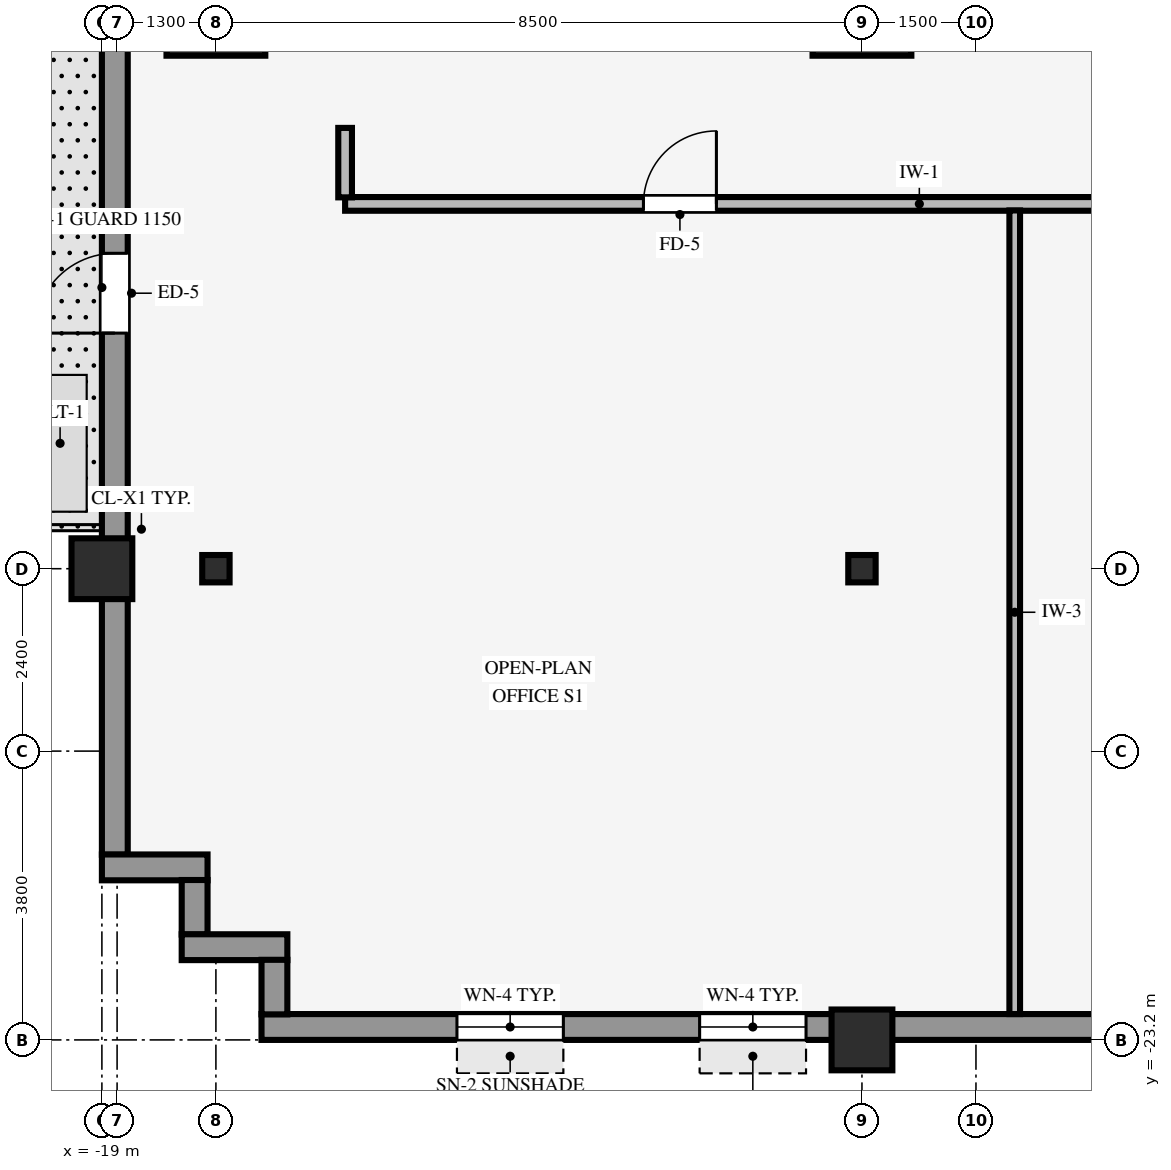
"""IFC4 building model, lengths in metres.
Left out: names, types, materials, properties, quantities, classifications, styles, units other than length and angle.
Written with IfcOpenShell. Run it as: python <this file> out.ifc"""

import sys

from ifc_helpers import new_model, si_unit, direction, frame, frame_2d, origin, origin_2d, place, context, subcontext, project, spatial, rectangle, hollow_rectangle, i_section, extrude, source, transform, mapped, element, fill, save


model = new_model("IFC4")
c1 = context("Model", 3, precision=1e-05, world=origin(), true_north=direction((0.0, 1.0)))
c2 = subcontext(c1, "Body", "Model", "MODEL_VIEW")
j1 = project(units=[si_unit("LENGTHUNIT", "METRE"), si_unit("PLANEANGLEUNIT", "RADIAN")], contexts=[c1])
p1 = place(None, origin())
s1 = spatial("IfcSite", under=j1, at=p1, CompositionType="ELEMENT")
p2 = place(p1, origin())
s2 = spatial("IfcBuilding", under=s1, at=p2, CompositionType="ELEMENT")
p3 = place(p2, frame((0.0, 0.0, 31.25)))
s3 = spatial("IfcBuildingStorey", under=s2, at=p3, CompositionType="ELEMENT", Elevation=31.25)
for number, where, z_axis, x_axis in (
    (1, (-17.5, -9.6, 0.0), (0.0, 0.0, 1.0), (1.0, 0.0, 0.0)),
    (2, (-9.0, -9.6, 0.0), (0.0, 0.0, 1.0), (1.0, 0.0, 0.0)),
):
    element("IfcColumn", number, at=place(p3, frame(where, z_axis=z_axis, x_axis=x_axis)), inside=s3, PredefinedType="COLUMN", context=c2, shape_type="SweptSolid", body=[
        extrude(rectangle(XDim=1.3, YDim=1.3, at=origin_2d()), origin(), (0.0, 0.0, 1.0), 3.37),
    ])
for number, where, z_axis, x_axis in (
    (3, (-19.0, -17.0, 0.0), (0.0, 0.0, 1.0), (1.0, 0.0, 0.0)),
    (4, (-9.0, -23.2, 0.0), (0.0, 0.0, 1.0), (1.0, 0.0, 0.0)),
):
    element("IfcColumn", number, at=place(p3, frame(where, z_axis=z_axis, x_axis=x_axis)), inside=s3, PredefinedType="COLUMN", context=c2, shape_type="SweptSolid", body=[
        extrude(hollow_rectangle(XDim=0.8, YDim=0.8, WallThickness=0.055, InnerFilletRadius=0.055, OuterFilletRadius=0.11, at=origin_2d()), origin(), (0.0, 0.0, 1.0), 3.37),
    ])
for number, where, z_axis, x_axis in (
    (5, (-17.5, -17.0, 0.0), (0.0, 0.0, 1.0), (1.0, 0.0, 0.0)),
    (6, (-9.0, -17.0, 0.0), (0.0, 0.0, 1.0), (1.0, 0.0, 0.0)),
):
    element("IfcColumn", number, at=place(p3, frame(where, z_axis=z_axis, x_axis=x_axis)), inside=s3, PredefinedType="COLUMN", context=c2, shape_type="SweptSolid", body=[
        extrude(i_section(OverallWidth=0.36, OverallDepth=0.36, WebThickness=0.021, FlangeThickness=0.021, FilletRadius=0.018, at=origin_2d()), origin(), (0.0, 0.0, 1.0), 3.37),
    ])
p4 = place(p3, frame((-16.9, -23.03, 0.0), z_axis=(0.0, 0.0, 1.0), x_axis=(1.0, 0.0, 0.0)))
e7 = element("IfcWall", 7, at=p4, inside=s3, PredefinedType="STANDARD", context=c2, shape_type="SweptSolid", body=[
    extrude(rectangle(XDim=33.8, YDim=0.34, at=frame_2d((16.9, 0.0))), origin(), (0.0, 0.0, 1.0), 2.705),
])
p5 = place(p4, frame((2.571, 0.0, 0.8)))
e8 = element("IfcOpeningElement", 8, at=p5, cuts=e7, PredefinedType="OPENING", context=c2, shape_type="SweptSolid", body=[
    extrude(rectangle(XDim=1.4, YDim=1.65, at=frame_2d((0.7, 0.825))), frame((0.0, 0.18, 0.0), z_axis=(0.0, -1.0, 0.0), x_axis=(1.0, 0.0, 0.0)), (0.0, 0.0, 1.0), 0.36),
])
p6 = place(p4, frame((5.764, 0.0, 0.8)))
e9 = element("IfcOpeningElement", 9, at=p6, cuts=e7, PredefinedType="OPENING", context=c2, shape_type="SweptSolid", body=[
    extrude(rectangle(XDim=1.4, YDim=1.65, at=frame_2d((0.7, 0.825))), frame((0.0, 0.18, 0.0), z_axis=(0.0, -1.0, 0.0), x_axis=(1.0, 0.0, 0.0)), (0.0, 0.0, 1.0), 0.36),
])
p7 = place(p4, frame((11.657, 0.0, 0.8)))
e10 = element("IfcOpeningElement", 10, at=p7, cuts=e7, PredefinedType="OPENING", context=c2, shape_type="SweptSolid", body=[
    extrude(rectangle(XDim=1.4, YDim=1.65, at=frame_2d((0.7, 0.825))), frame((0.0, 0.18, 0.0), z_axis=(0.0, -1.0, 0.0), x_axis=(1.0, 0.0, 0.0)), (0.0, 0.0, 1.0), 0.36),
])
p8 = place(p4, frame((20.743, 0.0, 0.8)))
e11 = element("IfcOpeningElement", 11, at=p8, cuts=e7, PredefinedType="OPENING", context=c2, shape_type="SweptSolid", body=[
    extrude(rectangle(XDim=1.4, YDim=1.65, at=frame_2d((0.7, 0.825))), frame((0.0, 0.18, 0.0), z_axis=(0.0, -1.0, 0.0), x_axis=(1.0, 0.0, 0.0)), (0.0, 0.0, 1.0), 0.36),
])
p9 = place(p4, frame((26.636, 0.0, 0.8)))
e12 = element("IfcOpeningElement", 12, at=p9, cuts=e7, PredefinedType="OPENING", context=c2, shape_type="SweptSolid", body=[
    extrude(rectangle(XDim=1.4, YDim=1.65, at=frame_2d((0.7, 0.825))), frame((0.0, 0.18, 0.0), z_axis=(0.0, -1.0, 0.0), x_axis=(1.0, 0.0, 0.0)), (0.0, 0.0, 1.0), 0.36),
])
p10 = place(p4, frame((29.829, 0.0, 0.8)))
e13 = element("IfcOpeningElement", 13, at=p10, cuts=e7, PredefinedType="OPENING", context=c2, shape_type="SweptSolid", body=[
    extrude(rectangle(XDim=1.4, YDim=1.65, at=frame_2d((0.7, 0.825))), frame((0.0, 0.18, 0.0), z_axis=(0.0, -1.0, 0.0), x_axis=(1.0, 0.0, 0.0)), (0.0, 0.0, 1.0), 0.36),
])
p11 = place(p3, frame((-18.83, -20.764, 0.0), z_axis=(0.0, 0.0, 1.0), x_axis=(0.0, 1.0, 0.0)))
e14 = element("IfcWall", 14, at=p11, inside=s3, PredefinedType="STANDARD", context=c2, shape_type="SweptSolid", body=[
    extrude(rectangle(XDim=41.528, YDim=0.34, at=frame_2d((20.764, 0.0))), origin(), (0.0, 0.0, 1.0), 2.705),
])
p12 = place(p11, frame((6.864, 0.0, 0.0)))
e15 = element("IfcOpeningElement", 15, at=p12, cuts=e14, PredefinedType="OPENING", context=c2, shape_type="SweptSolid", body=[
    extrude(rectangle(XDim=1.05, YDim=2.1, at=frame_2d((0.525, 1.05))), frame((0.0, 0.18, 0.0), z_axis=(0.0, -1.0, 0.0), x_axis=(1.0, 0.0, 0.0)), (0.0, 0.0, 1.0), 0.36),
])
p13 = place(p11, frame((32.467, 0.0, 0.8)))
e16 = element("IfcOpeningElement", 16, at=p13, cuts=e14, PredefinedType="OPENING", context=c2, shape_type="SweptSolid", body=[
    extrude(rectangle(XDim=2.2, YDim=1.65, at=frame_2d((1.1, 0.825))), frame((0.0, 0.18, 0.0), z_axis=(0.0, -1.0, 0.0), x_axis=(1.0, 0.0, 0.0)), (0.0, 0.0, 1.0), 0.36),
])
p14 = place(p3, frame((-19.0, -20.93, 0.0), z_axis=(0.0, 0.0, 1.0), x_axis=(1.0, 0.0, 0.0)))
e17 = element("IfcWall", 17, at=p14, inside=s3, PredefinedType="STANDARD", context=c2, shape_type="SweptSolid", body=[
    extrude(rectangle(XDim=1.39, YDim=0.34, at=frame_2d((0.695, 0.0))), origin(), (0.0, 0.0, 1.0), 3.36),
])
p15 = place(p3, frame((-17.78, -21.814, 0.0), z_axis=(0.0, 0.0, 1.0), x_axis=(0.0, 1.0, 0.0)))
e18 = element("IfcWall", 18, at=p15, inside=s3, PredefinedType="STANDARD", context=c2, shape_type="SweptSolid", body=[
    extrude(rectangle(XDim=0.718, YDim=0.34, at=frame_2d((0.359, 0.0))), origin(), (0.0, 0.0, 1.0), 3.36),
])
p16 = place(p3, frame((-17.95, -21.98, 0.0), z_axis=(0.0, 0.0, 1.0), x_axis=(1.0, 0.0, 0.0)))
e19 = element("IfcWall", 19, at=p16, inside=s3, PredefinedType="STANDARD", context=c2, shape_type="SweptSolid", body=[
    extrude(rectangle(XDim=1.39, YDim=0.34, at=frame_2d((0.695, 0.0))), origin(), (0.0, 0.0, 1.0), 3.36),
])
p17 = place(p3, frame((-16.73, -22.864, 0.0), z_axis=(0.0, 0.0, 1.0), x_axis=(0.0, 1.0, 0.0)))
e20 = element("IfcWall", 20, at=p17, inside=s3, PredefinedType="STANDARD", context=c2, shape_type="SweptSolid", body=[
    extrude(rectangle(XDim=0.718, YDim=0.34, at=frame_2d((0.359, 0.0))), origin(), (0.0, 0.0, 1.0), 3.36),
])
p18 = place(p3, frame((-15.8, -12.2, 0.0), z_axis=(0.0, 0.0, 1.0), x_axis=(1.0, 0.0, 0.0)))
e21 = element("IfcWall", 21, at=p18, inside=s3, PredefinedType="PARTITIONING", context=c2, shape_type="SweptSolid", body=[
    extrude(rectangle(XDim=24.6, YDim=0.18, at=frame_2d((12.3, 0.0))), origin(), (0.0, 0.0, 1.0), 3.36),
])
p19 = place(p18, frame((3.925, 0.0, 0.0)))
e22 = element("IfcOpeningElement", 22, at=p19, cuts=e21, PredefinedType="OPENING", context=c2, shape_type="SweptSolid", body=[
    extrude(rectangle(XDim=0.96, YDim=2.1, at=frame_2d((0.48, 1.05))), frame((0.0, 0.1, 0.0), z_axis=(0.0, -1.0, 0.0), x_axis=(1.0, 0.0, 0.0)), (0.0, 0.0, 1.0), 0.2),
])
p20 = place(p18, frame((10.225, 0.0, 0.0)))
e23 = element("IfcOpeningElement", 23, at=p20, cuts=e21, PredefinedType="OPENING", context=c2, shape_type="SweptSolid", body=[
    extrude(rectangle(XDim=0.96, YDim=2.1, at=frame_2d((0.48, 1.05))), frame((0.0, 0.1, 0.0), z_axis=(0.0, -1.0, 0.0), x_axis=(1.0, 0.0, 0.0)), (0.0, 0.0, 1.0), 0.2),
])
p21 = place(p18, frame((20.45, 0.0, 0.0)))
e24 = element("IfcOpeningElement", 24, at=p21, cuts=e21, PredefinedType="OPENING", context=c2, shape_type="SweptSolid", body=[
    extrude(rectangle(XDim=0.9, YDim=2.1, at=frame_2d((0.45, 1.05))), frame((0.0, 0.1, 0.0), z_axis=(0.0, -1.0, 0.0), x_axis=(1.0, 0.0, 0.0)), (0.0, 0.0, 1.0), 0.2),
])
p22 = place(p18, frame((17.85, 0.0, 0.0)))
e25 = element("IfcOpeningElement", 25, at=p22, cuts=e21, PredefinedType="OPENING", context=c2, shape_type="SweptSolid", body=[
    extrude(rectangle(XDim=0.9, YDim=2.1, at=frame_2d((0.45, 1.05))), frame((0.0, 0.1, 0.0), z_axis=(0.0, -1.0, 0.0), x_axis=(1.0, 0.0, 0.0)), (0.0, 0.0, 1.0), 0.2),
])
p23 = place(p18, frame((22.95, 0.0, 0.0)))
e26 = element("IfcOpeningElement", 26, at=p23, cuts=e21, PredefinedType="OPENING", context=c2, shape_type="SweptSolid", body=[
    extrude(rectangle(XDim=0.9, YDim=2.1, at=frame_2d((0.45, 1.05))), frame((0.0, 0.1, 0.0), z_axis=(0.0, -1.0, 0.0), x_axis=(1.0, 0.0, 0.0)), (0.0, 0.0, 1.0), 0.2),
])
p24 = place(p18, frame((15.52, 0.0, 0.0)))
e27 = element("IfcOpeningElement", 27, at=p24, cuts=e21, PredefinedType="OPENING", context=c2, shape_type="SweptSolid", body=[
    extrude(rectangle(XDim=0.96, YDim=2.1, at=frame_2d((0.48, 1.05))), frame((0.0, 0.1, 0.0), z_axis=(0.0, -1.0, 0.0), x_axis=(1.0, 0.0, 0.0)), (0.0, 0.0, 1.0), 0.2),
])
p25 = place(p3, frame((-15.8, -12.114, 0.0), z_axis=(0.0, 0.0, 1.0), x_axis=(0.0, 1.0, 0.0)))
e28 = element("IfcWall", 28, at=p25, inside=s3, PredefinedType="PARTITIONING", context=c2, shape_type="SweptSolid", body=[
    extrude(rectangle(XDim=0.914, YDim=0.18, at=frame_2d((0.457, 0.0))), origin(), (0.0, 0.0, 1.0), 3.36),
])
p26 = place(p3, frame((-6.99, -22.86, 0.0), z_axis=(0.0, 0.0, 1.0), x_axis=(0.0, 1.0, 0.0)))
e29 = element("IfcWall", 29, at=p26, inside=s3, PredefinedType="PARTITIONING", context=c2, shape_type="SweptSolid", body=[
    extrude(rectangle(XDim=10.574, YDim=0.14, at=frame_2d((5.287, 0.0))), origin(), (0.0, 0.0, 1.0), 3.36),
])
m1 = source(origin(), c2, "Body", "SweptSolid", [
    extrude(rectangle(XDim=1.4, YDim=1.65, at=frame_2d((0.7, 0.825))), frame((0.0, 0.03, 0.0), z_axis=(0.0, -1.0, 0.0), x_axis=(1.0, 0.0, 0.0)), (0.0, 0.0, 1.0), 0.06),
])
p27 = place(p5, origin())
e30 = element("IfcWindow", 30, at=p27, inside=s3, PartitioningType="SINGLE_PANEL", PredefinedType="WINDOW", context=c2, shape_type="MappedRepresentation", body=[
    mapped(m1, transform((0.0, 0.0, 0.0), scale=1.0)),
])
fill(e8, e30)
p28 = place(p6, origin())
e31 = element("IfcWindow", 31, at=p28, inside=s3, PartitioningType="SINGLE_PANEL", PredefinedType="WINDOW", context=c2, shape_type="MappedRepresentation", body=[
    mapped(m1, transform((0.0, 0.0, 0.0), scale=1.0)),
])
fill(e9, e31)
m2 = source(origin(), c2, "Body", "SweptSolid", [
    extrude(rectangle(XDim=1.05, YDim=2.1, at=frame_2d((0.525, 1.05))), frame((0.0, 0.025, 0.0), z_axis=(0.0, -1.0, 0.0), x_axis=(1.0, 0.0, 0.0)), (0.0, 0.0, 1.0), 0.05),
])
p29 = place(p12, origin())
e32 = element("IfcDoor", 32, at=p29, inside=s3, OperationType="SINGLE_SWING_LEFT", PredefinedType="DOOR", context=c2, shape_type="MappedRepresentation", body=[
    mapped(m2, transform((0.0, 0.0, 0.0), scale=1.0)),
])
fill(e15, e32)
m3 = source(origin(), c2, "Body", "SweptSolid", [
    extrude(rectangle(XDim=0.96, YDim=2.1, at=frame_2d((0.48, 1.05))), frame((0.0, 0.025, 0.0), z_axis=(0.0, -1.0, 0.0), x_axis=(1.0, 0.0, 0.0)), (0.0, 0.0, 1.0), 0.05),
])
p30 = place(p19, origin())
e33 = element("IfcDoor", 33, at=p30, inside=s3, OperationType="SINGLE_SWING_RIGHT", PredefinedType="DOOR", context=c2, shape_type="MappedRepresentation", body=[
    mapped(m3, transform((0.0, 0.0, 0.0), scale=1.0)),
])
fill(e22, e33)
save(model, sys.argv[1])
